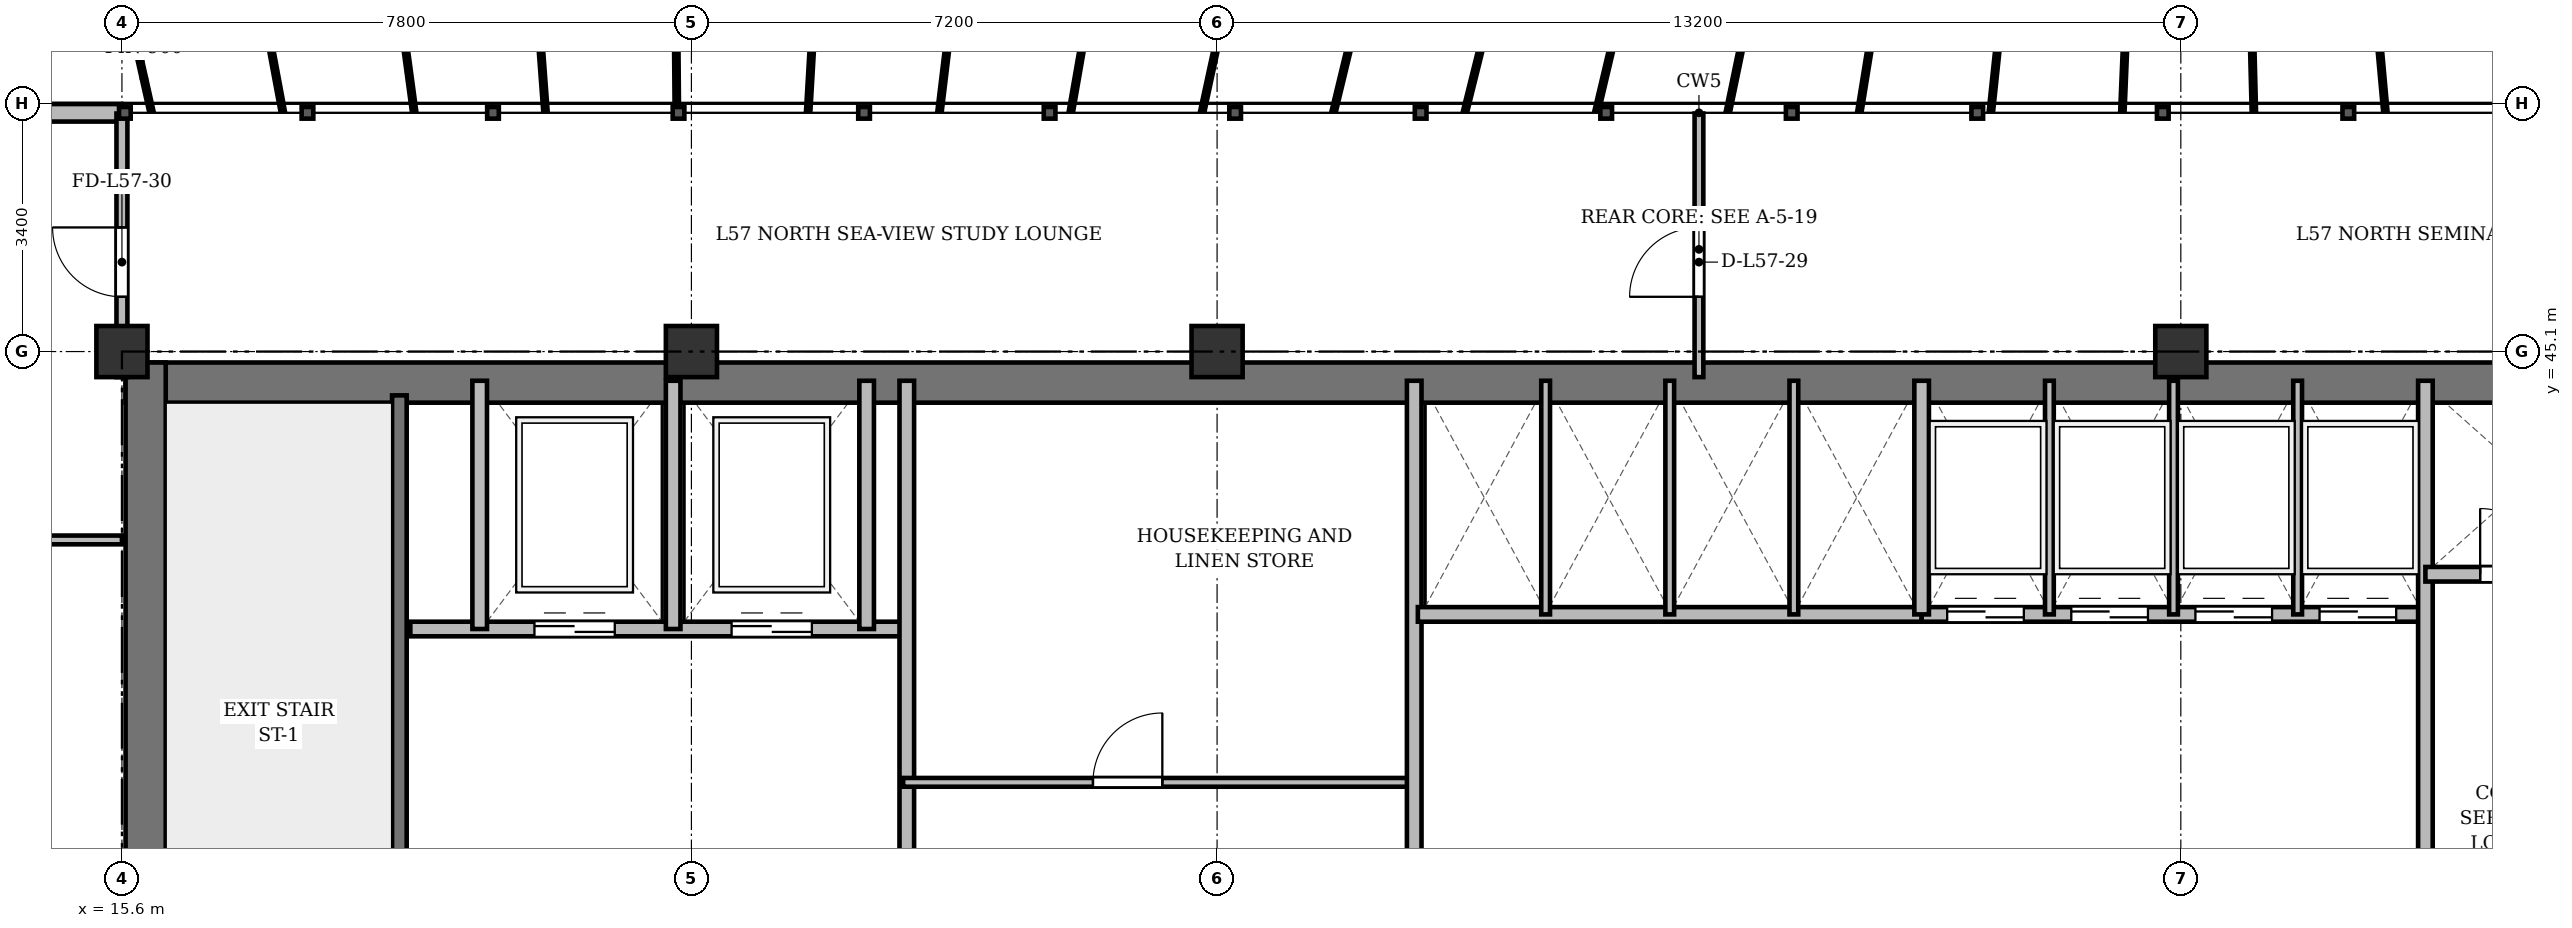
"""IFC4 building model, lengths in metres.
Left out: names, types, materials, properties, quantities, classifications, styles, units other than length and angle.
Written with IfcOpenShell. Run it as: python <this file> out.ifc"""

import sys

from ifc_helpers import new_model, si_unit, direction, frame, frame_2d, origin, origin_2d, place, context, subcontext, project, spatial, rectangle, extrude, source, transform, mapped, element, fill, save


model = new_model("IFC4")
c1 = context("Model", 3, precision=1e-05, world=origin(), true_north=direction((0.0, 1.0)))
c2 = subcontext(c1, "Body", "Model", "MODEL_VIEW")
j1 = project(units=[si_unit("LENGTHUNIT", "METRE"), si_unit("PLANEANGLEUNIT", "RADIAN")], contexts=[c1])
p1 = place(None, origin())
s1 = spatial("IfcSite", under=j1, at=p1, CompositionType="ELEMENT")
p2 = place(p1, origin())
s2 = spatial("IfcBuilding", under=s1, at=p2, CompositionType="ELEMENT")
p3 = place(p2, frame((0.0, 0.0, 219.3)))
s3 = spatial("IfcBuildingStorey", under=s2, at=p3, CompositionType="ELEMENT", Elevation=219.3)
m1 = source(origin(), c2, "Body", "SweptSolid", [
    extrude(rectangle(XDim=0.7, YDim=0.7, at=origin_2d()), origin(), (0.0, 0.0, 1.0), 3.6),
])
for number, where, z_axis, x_axis in (
    (1, (15.6, 45.1, 0.0), (0.0, 0.0, 1.0), (1.0, 0.0, 0.0)),
    (2, (23.4, 45.1, 0.0), (0.0, 0.0, 1.0), (1.0, 0.0, 0.0)),
    (3, (30.6, 45.1, 0.0), (0.0, 0.0, 1.0), (1.0, 0.0, 0.0)),
    (4, (43.8, 45.1, 0.0), (0.0, 0.0, 1.0), (1.0, 0.0, 0.0)),
):
    element("IfcColumn", number, at=place(p3, frame(where, z_axis=z_axis, x_axis=x_axis)), inside=s3, PredefinedType="COLUMN", context=c2, shape_type="MappedRepresentation", body=[
        mapped(m1, transform((0.0, 0.0, 0.0), x_axis=(1.0, 0.0, 0.0), y_axis=(0.0, 1.0, 0.0), z_axis=(0.0, 0.0, 1.0), scale=1.0)),
    ])
p4 = place(p3, frame((11.1, 48.37, 0.0), z_axis=(0.0, 0.0, 1.0), x_axis=(1.0, 0.0, 0.0)))
e5 = element("IfcWall", 5, at=p4, inside=s3, PredefinedType="SOLIDWALL", context=c2, shape_type="SweptSolid", body=[
    extrude(rectangle(XDim=4.5, YDim=0.24, at=frame_2d((2.25, 0.0))), origin(), (0.0, 0.0, 1.0), 3.36),
])
p5 = place(p4, frame((2.003, 0.0, 0.9)))
e6 = element("IfcOpeningElement", 6, at=p5, cuts=e5, PredefinedType="OPENING", context=c2, shape_type="SweptSolid", body=[
    extrude(rectangle(XDim=1.35, YDim=1.5, at=frame_2d((0.675, 0.75))), frame((0.0, 0.13, 0.0), z_axis=(0.0, -1.0, 0.0), x_axis=(1.0, 0.0, 0.0)), (0.0, 0.0, 1.0), 0.26),
])
p6 = place(p3, frame((15.65, 44.675, 0.0), z_axis=(0.0, 0.0, 1.0), x_axis=(1.0, 0.0, 0.0)))
e7 = element("IfcWall", 7, at=p6, inside=s3, PredefinedType="SHEAR", context=c2, shape_type="SweptSolid", body=[
    extrude(rectangle(XDim=43.1, YDim=0.55, at=frame_2d((21.55, 0.0))), origin(), (0.0, 0.0, 1.0), 3.36),
])
p7 = place(p3, frame((15.925, 33.4, 0.0), z_axis=(0.0, 0.0, 1.0), x_axis=(0.0, 1.0, 0.0)))
e8 = element("IfcWall", 8, at=p7, inside=s3, PredefinedType="SHEAR", context=c2, shape_type="SweptSolid", body=[
    extrude(rectangle(XDim=11.55, YDim=0.55, at=frame_2d((5.775, 0.0))), origin(), (0.0, 0.0, 1.0), 3.36),
])
p8 = place(p3, frame((19.4, 33.4, 0.0), z_axis=(0.0, 0.0, 1.0), x_axis=(0.0, 1.0, 0.0)))
e9 = element("IfcWall", 9, at=p8, inside=s3, PredefinedType="SHEAR", context=c2, shape_type="SweptSolid", body=[
    extrude(rectangle(XDim=11.1, YDim=0.2, at=frame_2d((5.55, 0.0))), origin(), (0.0, 0.0, 1.0), 3.36),
])
p9 = place(p8, frame((0.85, 0.0, 0.0)))
e10 = element("IfcOpeningElement", 10, at=p9, cuts=e9, PredefinedType="OPENING", context=c2, shape_type="SweptSolid", body=[
    extrude(rectangle(XDim=1.1, YDim=2.15, at=frame_2d((0.55, 1.075))), frame((0.0, 0.11, 0.0), z_axis=(0.0, -1.0, 0.0), x_axis=(1.0, 0.0, 0.0)), (0.0, 0.0, 1.0), 0.22),
])
p10 = place(p3, frame((19.55, 41.3, 0.0), z_axis=(0.0, 0.0, 1.0), x_axis=(1.0, 0.0, 0.0)))
e11 = element("IfcWall", 11, at=p10, inside=s3, PredefinedType="SOLIDWALL", context=c2, shape_type="SweptSolid", body=[
    extrude(rectangle(XDim=6.75, YDim=0.2, at=frame_2d((3.375, 0.0))), origin(), (0.0, 0.0, 1.0), 3.36),
])
p11 = place(p10, frame((1.7, 0.0, 0.0)))
e12 = element("IfcOpeningElement", 12, at=p11, cuts=e11, PredefinedType="OPENING", context=c2, shape_type="SweptSolid", body=[
    extrude(rectangle(XDim=1.1, YDim=2.15, at=frame_2d((0.55, 1.075))), frame((0.0, 0.11, 0.0), z_axis=(0.0, -1.0, 0.0), x_axis=(1.0, 0.0, 0.0)), (0.0, 0.0, 1.0), 0.22),
])
p12 = place(p10, frame((4.4, 0.0, 0.0)))
e13 = element("IfcOpeningElement", 13, at=p12, cuts=e11, PredefinedType="OPENING", context=c2, shape_type="SweptSolid", body=[
    extrude(rectangle(XDim=1.1, YDim=2.15, at=frame_2d((0.55, 1.075))), frame((0.0, 0.11, 0.0), z_axis=(0.0, -1.0, 0.0), x_axis=(1.0, 0.0, 0.0)), (0.0, 0.0, 1.0), 0.22),
])
for number, where, z_axis, x_axis in (
    (14, (20.5, 41.3, 0.0), (0.0, 0.0, 1.0), (0.0, 1.0, 0.0)),
    (15, (23.15, 41.3, 0.0), (0.0, 0.0, 1.0), (0.0, 1.0, 0.0)),
    (16, (25.8, 41.3, 0.0), (0.0, 0.0, 1.0), (0.0, 1.0, 0.0)),
):
    element("IfcWall", number, at=place(p3, frame(where, z_axis=z_axis, x_axis=x_axis)), inside=s3, PredefinedType="SOLIDWALL", context=c2, shape_type="SweptSolid", body=[
        extrude(rectangle(XDim=3.4, YDim=0.2, at=frame_2d((1.7, 0.0))), origin(), (0.0, 0.0, 1.0), 3.36),
    ])
p13 = place(p3, frame((26.35, 33.4, 0.0), z_axis=(0.0, 0.0, 1.0), x_axis=(0.0, 1.0, 0.0)))
e17 = element("IfcWall", 17, at=p13, inside=s3, PredefinedType="SOLIDWALL", context=c2, shape_type="SweptSolid", body=[
    extrude(rectangle(XDim=11.3, YDim=0.2, at=frame_2d((5.65, 0.0))), origin(), (0.0, 0.0, 1.0), 2.91),
])
p14 = place(p3, frame((26.3, 39.2, 0.0), z_axis=(0.0, 0.0, 1.0), x_axis=(1.0, 0.0, 0.0)))
e18 = element("IfcWall", 18, at=p14, inside=s3, PredefinedType="PARTITIONING", context=c2, shape_type="SweptSolid", body=[
    extrude(rectangle(XDim=7.0, YDim=0.12, at=frame_2d((3.5, 0.0))), origin(), (0.0, 0.0, 1.0), 2.86),
])
p15 = place(p14, frame((2.6, 0.0, 0.0)))
e19 = element("IfcOpeningElement", 19, at=p15, cuts=e18, PredefinedType="OPENING", context=c2, shape_type="SweptSolid", body=[
    extrude(rectangle(XDim=0.95, YDim=2.15, at=frame_2d((0.475, 1.075))), frame((0.0, 0.07, 0.0), z_axis=(0.0, -1.0, 0.0), x_axis=(1.0, 0.0, 0.0)), (0.0, 0.0, 1.0), 0.14),
])
p16 = place(p3, frame((33.3, 33.4, 0.0), z_axis=(0.0, 0.0, 1.0), x_axis=(0.0, 1.0, 0.0)))
e20 = element("IfcWall", 20, at=p16, inside=s3, PredefinedType="SOLIDWALL", context=c2, shape_type="SweptSolid", body=[
    extrude(rectangle(XDim=11.3, YDim=0.2, at=frame_2d((5.65, 0.0))), origin(), (0.0, 0.0, 1.0), 2.91),
])
p17 = place(p3, frame((33.35, 41.5, 0.0), z_axis=(0.0, 0.0, 1.0), x_axis=(1.0, 0.0, 0.0)))
e21 = element("IfcWall", 21, at=p17, inside=s3, PredefinedType="SOLIDWALL", context=c2, shape_type="SweptSolid", body=[
    extrude(rectangle(XDim=6.9, YDim=0.2, at=frame_2d((3.45, 0.0))), origin(), (0.0, 0.0, 1.0), 3.36),
])
for number, where, z_axis, x_axis in (
    (22, (35.1, 41.5, 0.0), (0.0, 0.0, 1.0), (0.0, 1.0, 0.0)),
    (23, (36.8, 41.5, 0.0), (0.0, 0.0, 1.0), (0.0, 1.0, 0.0)),
    (24, (38.5, 41.5, 0.0), (0.0, 0.0, 1.0), (0.0, 1.0, 0.0)),
):
    element("IfcWall", number, at=place(p3, frame(where, z_axis=z_axis, x_axis=x_axis)), inside=s3, PredefinedType="PARTITIONING", context=c2, shape_type="SweptSolid", body=[
        extrude(rectangle(XDim=3.2, YDim=0.12, at=frame_2d((1.6, 0.0))), origin(), (0.0, 0.0, 1.0), 3.36),
    ])
p18 = place(p3, frame((40.25, 41.5, 0.0), z_axis=(0.0, 0.0, 1.0), x_axis=(1.0, 0.0, 0.0)))
e25 = element("IfcWall", 25, at=p18, inside=s3, PredefinedType="SOLIDWALL", context=c2, shape_type="SweptSolid", body=[
    extrude(rectangle(XDim=6.9, YDim=0.2, at=frame_2d((3.45, 0.0))), origin(), (0.0, 0.0, 1.0), 3.36),
])
p19 = place(p18, frame((0.35, 0.0, 0.0)))
e26 = element("IfcOpeningElement", 26, at=p19, cuts=e25, PredefinedType="OPENING", context=c2, shape_type="SweptSolid", body=[
    extrude(rectangle(XDim=1.05, YDim=2.15, at=frame_2d((0.525, 1.075))), frame((0.0, 0.11, 0.0), z_axis=(0.0, -1.0, 0.0), x_axis=(1.0, 0.0, 0.0)), (0.0, 0.0, 1.0), 0.22),
])
p20 = place(p18, frame((2.05, 0.0, 0.0)))
e27 = element("IfcOpeningElement", 27, at=p20, cuts=e25, PredefinedType="OPENING", context=c2, shape_type="SweptSolid", body=[
    extrude(rectangle(XDim=1.05, YDim=2.15, at=frame_2d((0.525, 1.075))), frame((0.0, 0.11, 0.0), z_axis=(0.0, -1.0, 0.0), x_axis=(1.0, 0.0, 0.0)), (0.0, 0.0, 1.0), 0.22),
])
p21 = place(p18, frame((3.75, 0.0, 0.0)))
e28 = element("IfcOpeningElement", 28, at=p21, cuts=e25, PredefinedType="OPENING", context=c2, shape_type="SweptSolid", body=[
    extrude(rectangle(XDim=1.05, YDim=2.15, at=frame_2d((0.525, 1.075))), frame((0.0, 0.11, 0.0), z_axis=(0.0, -1.0, 0.0), x_axis=(1.0, 0.0, 0.0)), (0.0, 0.0, 1.0), 0.22),
])
p22 = place(p18, frame((5.45, 0.0, 0.0)))
e29 = element("IfcOpeningElement", 29, at=p22, cuts=e25, PredefinedType="OPENING", context=c2, shape_type="SweptSolid", body=[
    extrude(rectangle(XDim=1.05, YDim=2.15, at=frame_2d((0.525, 1.075))), frame((0.0, 0.11, 0.0), z_axis=(0.0, -1.0, 0.0), x_axis=(1.0, 0.0, 0.0)), (0.0, 0.0, 1.0), 0.22),
])
p23 = place(p3, frame((40.25, 41.5, 0.0), z_axis=(0.0, 0.0, 1.0), x_axis=(0.0, 1.0, 0.0)))
e30 = element("IfcWall", 30, at=p23, inside=s3, PredefinedType="SOLIDWALL", context=c2, shape_type="SweptSolid", body=[
    extrude(rectangle(XDim=3.2, YDim=0.2, at=frame_2d((1.6, 0.0))), origin(), (0.0, 0.0, 1.0), 3.36),
])
for number, where, z_axis, x_axis in (
    (31, (42.0, 41.5, 0.0), (0.0, 0.0, 1.0), (0.0, 1.0, 0.0)),
    (32, (43.7, 41.5, 0.0), (0.0, 0.0, 1.0), (0.0, 1.0, 0.0)),
    (33, (45.4, 41.5, 0.0), (0.0, 0.0, 1.0), (0.0, 1.0, 0.0)),
):
    element("IfcWall", number, at=place(p3, frame(where, z_axis=z_axis, x_axis=x_axis)), inside=s3, PredefinedType="PARTITIONING", context=c2, shape_type="SweptSolid", body=[
        extrude(rectangle(XDim=3.2, YDim=0.12, at=frame_2d((1.6, 0.0))), origin(), (0.0, 0.0, 1.0), 3.36),
    ])
p24 = place(p3, frame((47.15, 33.4, 0.0), z_axis=(0.0, 0.0, 1.0), x_axis=(0.0, 1.0, 0.0)))
e34 = element("IfcWall", 34, at=p24, inside=s3, PredefinedType="SOLIDWALL", context=c2, shape_type="SweptSolid", body=[
    extrude(rectangle(XDim=11.3, YDim=0.2, at=frame_2d((5.65, 0.0))), origin(), (0.0, 0.0, 1.0), 2.91),
])
p25 = place(p3, frame((47.15, 42.05, 0.0), z_axis=(0.0, 0.0, 1.0), x_axis=(1.0, 0.0, 0.0)))
e35 = element("IfcWall", 35, at=p25, inside=s3, PredefinedType="SOLIDWALL", context=c2, shape_type="SweptSolid", body=[
    extrude(rectangle(XDim=7.85, YDim=0.2, at=frame_2d((3.925, 0.0))), origin(), (0.0, 0.0, 1.0), 2.86),
])
p26 = place(p25, frame((0.75, 0.0, 0.0)))
e36 = element("IfcOpeningElement", 36, at=p26, cuts=e35, PredefinedType="OPENING", context=c2, shape_type="SweptSolid", body=[
    extrude(rectangle(XDim=0.9, YDim=2.1, at=frame_2d((0.45, 1.05))), frame((0.0, 0.11, 0.0), z_axis=(0.0, -1.0, 0.0), x_axis=(1.0, 0.0, 0.0)), (0.0, 0.0, 1.0), 0.22),
])
p27 = place(p25, frame((3.85, 0.0, 0.0)))
e37 = element("IfcOpeningElement", 37, at=p27, cuts=e35, PredefinedType="OPENING", context=c2, shape_type="SweptSolid", body=[
    extrude(rectangle(XDim=0.9, YDim=2.1, at=frame_2d((0.45, 1.05))), frame((0.0, 0.11, 0.0), z_axis=(0.0, -1.0, 0.0), x_axis=(1.0, 0.0, 0.0)), (0.0, 0.0, 1.0), 0.22),
])
p28 = place(p3, frame((11.925, 42.52, 0.0), z_axis=(0.0, 0.0, 1.0), x_axis=(1.0, 0.0, 0.0)))
e38 = element("IfcWall", 38, at=p28, inside=s3, PredefinedType="PARTITIONING", context=c2, shape_type="SweptSolid", body=[
    extrude(rectangle(XDim=3.675, YDim=0.12, at=frame_2d((1.837, 0.0))), origin(), (0.0, 0.0, 1.0), 2.86),
])
p29 = place(p28, frame((1.362, 0.0, 0.0)))
e39 = element("IfcOpeningElement", 39, at=p29, cuts=e38, PredefinedType="OPENING", context=c2, shape_type="SweptSolid", body=[
    extrude(rectangle(XDim=0.95, YDim=2.15, at=frame_2d((0.475, 1.075))), frame((0.0, 0.07, 0.0), z_axis=(0.0, -1.0, 0.0), x_axis=(1.0, 0.0, 0.0)), (0.0, 0.0, 1.0), 0.14),
])
p30 = place(p3, frame((37.2, 44.75, 0.0), z_axis=(0.0, 0.0, 1.0), x_axis=(0.0, 1.0, 0.0)))
e40 = element("IfcWall", 40, at=p30, inside=s3, PredefinedType="PARTITIONING", context=c2, shape_type="SweptSolid", body=[
    extrude(rectangle(XDim=3.61, YDim=0.12, at=frame_2d((1.805, 0.0))), origin(), (0.0, 0.0, 1.0), 2.91),
])
p31 = place(p30, frame((1.1, 0.0, 0.0)))
e41 = element("IfcOpeningElement", 41, at=p31, cuts=e40, PredefinedType="OPENING", context=c2, shape_type="SweptSolid", body=[
    extrude(rectangle(XDim=0.95, YDim=2.15, at=frame_2d((0.475, 1.075))), frame((0.0, 0.07, 0.0), z_axis=(0.0, -1.0, 0.0), x_axis=(1.0, 0.0, 0.0)), (0.0, 0.0, 1.0), 0.14),
])
p32 = place(p3, frame((15.6, 44.75, 0.0), z_axis=(0.0, 0.0, 1.0), x_axis=(0.0, 1.0, 0.0)))
e42 = element("IfcWall", 42, at=p32, inside=s3, PredefinedType="PARTITIONING", context=c2, shape_type="SweptSolid", body=[
    extrude(rectangle(XDim=3.61, YDim=0.15, at=frame_2d((1.805, 0.0))), origin(), (0.0, 0.0, 1.0), 2.86),
])
p33 = place(p32, frame((1.1, 0.0, 0.0)))
e43 = element("IfcOpeningElement", 43, at=p33, cuts=e42, PredefinedType="OPENING", context=c2, shape_type="SweptSolid", body=[
    extrude(rectangle(XDim=0.95, YDim=2.15, at=frame_2d((0.475, 1.075))), frame((0.0, 0.085, 0.0), z_axis=(0.0, -1.0, 0.0), x_axis=(1.0, 0.0, 0.0)), (0.0, 0.0, 1.0), 0.17),
])
m2 = source(origin(), c2, "Body", "SweptSolid", [
    extrude(rectangle(XDim=1.1, YDim=2.15, at=frame_2d((0.55, 1.075))), frame((0.0, 0.025, 0.0), z_axis=(0.0, -1.0, 0.0), x_axis=(1.0, 0.0, 0.0)), (0.0, 0.0, 1.0), 0.05),
])
p34 = place(p11, origin())
e44 = element("IfcDoor", 44, at=p34, inside=s3, OperationType="DOUBLE_DOOR_SLIDING", PredefinedType="DOOR", context=c2, shape_type="MappedRepresentation", body=[
    mapped(m2, transform((0.0, 0.0, 0.0), x_axis=(1.0, 0.0, 0.0), y_axis=(0.0, 1.0, 0.0), z_axis=(0.0, 0.0, 1.0), scale=1.0)),
])
fill(e12, e44)
p35 = place(p12, origin())
e45 = element("IfcDoor", 45, at=p35, inside=s3, OperationType="DOUBLE_DOOR_SLIDING", PredefinedType="DOOR", context=c2, shape_type="MappedRepresentation", body=[
    mapped(m2, transform((0.0, 0.0, 0.0), x_axis=(1.0, 0.0, 0.0), y_axis=(0.0, 1.0, 0.0), z_axis=(0.0, 0.0, 1.0), scale=1.0)),
])
fill(e13, e45)
m3 = source(origin(), c2, "Body", "SweptSolid", [
    extrude(rectangle(XDim=0.95, YDim=2.15, at=frame_2d((0.475, 1.075))), frame((0.0, 0.025, 0.0), z_axis=(0.0, -1.0, 0.0), x_axis=(1.0, 0.0, 0.0)), (0.0, 0.0, 1.0), 0.05),
])
p36 = place(p15, origin())
e46 = element("IfcDoor", 46, at=p36, inside=s3, OperationType="SINGLE_SWING_RIGHT", PredefinedType="DOOR", context=c2, shape_type="MappedRepresentation", body=[
    mapped(m3, transform((0.0, 0.0, 0.0), x_axis=(1.0, 0.0, 0.0), y_axis=(0.0, 1.0, 0.0), z_axis=(0.0, 0.0, 1.0), scale=1.0)),
])
fill(e19, e46)
m4 = source(origin(), c2, "Body", "SweptSolid", [
    extrude(rectangle(XDim=1.05, YDim=2.15, at=frame_2d((0.525, 1.075))), frame((0.0, 0.025, 0.0), z_axis=(0.0, -1.0, 0.0), x_axis=(1.0, 0.0, 0.0)), (0.0, 0.0, 1.0), 0.05),
])
p37 = place(p19, origin())
e47 = element("IfcDoor", 47, at=p37, inside=s3, OperationType="DOUBLE_DOOR_SLIDING", PredefinedType="DOOR", context=c2, shape_type="MappedRepresentation", body=[
    mapped(m4, transform((0.0, 0.0, 0.0), x_axis=(1.0, 0.0, 0.0), y_axis=(0.0, 1.0, 0.0), z_axis=(0.0, 0.0, 1.0), scale=1.0)),
])
fill(e26, e47)
p38 = place(p20, origin())
e48 = element("IfcDoor", 48, at=p38, inside=s3, OperationType="DOUBLE_DOOR_SLIDING", PredefinedType="DOOR", context=c2, shape_type="MappedRepresentation", body=[
    mapped(m4, transform((0.0, 0.0, 0.0), x_axis=(1.0, 0.0, 0.0), y_axis=(0.0, 1.0, 0.0), z_axis=(0.0, 0.0, 1.0), scale=1.0)),
])
fill(e27, e48)
p39 = place(p21, origin())
e49 = element("IfcDoor", 49, at=p39, inside=s3, OperationType="DOUBLE_DOOR_SLIDING", PredefinedType="DOOR", context=c2, shape_type="MappedRepresentation", body=[
    mapped(m4, transform((0.0, 0.0, 0.0), x_axis=(1.0, 0.0, 0.0), y_axis=(0.0, 1.0, 0.0), z_axis=(0.0, 0.0, 1.0), scale=1.0)),
])
fill(e28, e49)
p40 = place(p22, origin())
e50 = element("IfcDoor", 50, at=p40, inside=s3, OperationType="DOUBLE_DOOR_SLIDING", PredefinedType="DOOR", context=c2, shape_type="MappedRepresentation", body=[
    mapped(m4, transform((0.0, 0.0, 0.0), x_axis=(1.0, 0.0, 0.0), y_axis=(0.0, 1.0, 0.0), z_axis=(0.0, 0.0, 1.0), scale=1.0)),
])
fill(e29, e50)
m5 = source(origin(), c2, "Body", "SweptSolid", [
    extrude(rectangle(XDim=0.9, YDim=2.1, at=frame_2d((0.45, 1.05))), frame((0.0, 0.025, 0.0), z_axis=(0.0, -1.0, 0.0), x_axis=(1.0, 0.0, 0.0)), (0.0, 0.0, 1.0), 0.05),
])
p41 = place(p26, origin())
e51 = element("IfcDoor", 51, at=p41, inside=s3, OperationType="SINGLE_SWING_LEFT", PredefinedType="DOOR", context=c2, shape_type="MappedRepresentation", body=[
    mapped(m5, transform((0.0, 0.0, 0.0), x_axis=(1.0, 0.0, 0.0), y_axis=(0.0, 1.0, 0.0), z_axis=(0.0, 0.0, 1.0), scale=1.0)),
])
fill(e36, e51)
p42 = place(p31, origin())
e52 = element("IfcDoor", 52, at=p42, inside=s3, OperationType="SINGLE_SWING_LEFT", PredefinedType="DOOR", context=c2, shape_type="MappedRepresentation", body=[
    mapped(m3, transform((0.0, 0.0, 0.0), x_axis=(1.0, 0.0, 0.0), y_axis=(0.0, 1.0, 0.0), z_axis=(0.0, 0.0, 1.0), scale=1.0)),
])
fill(e41, e52)
p43 = place(p33, origin())
e53 = element("IfcDoor", 53, at=p43, inside=s3, OperationType="SINGLE_SWING_RIGHT", PredefinedType="DOOR", context=c2, shape_type="MappedRepresentation", body=[
    mapped(m3, transform((0.0, 0.0, 0.0), x_axis=(1.0, 0.0, 0.0), y_axis=(0.0, 1.0, 0.0), z_axis=(0.0, 0.0, 1.0), scale=1.0)),
])
fill(e43, e53)
save(model, sys.argv[1])
